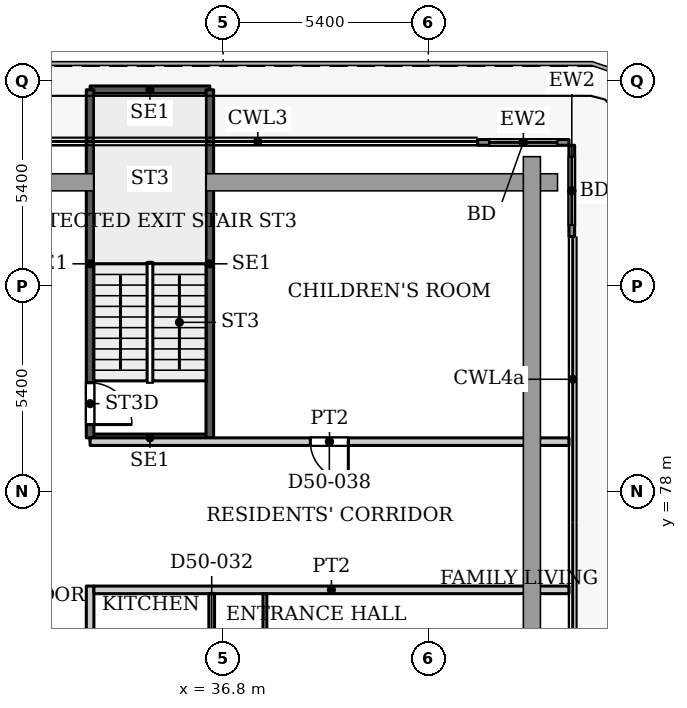
"""IFC4 building model, lengths in metres.
Left out: names, types, materials, properties, quantities, classifications, styles, units other than length and angle.
Written with IfcOpenShell. Run it as: python <this file> out.ifc"""

import sys

from ifc_helpers import new_model, si_unit, direction, frame, frame_2d, origin, place, context, subcontext, project, spatial, rectangle, extrude, source, transform, mapped, element, fill, save


model = new_model("IFC4")
c1 = context("Model", 3, precision=1e-05, world=origin(), true_north=direction((0.0, 1.0)))
c2 = subcontext(c1, "Body", "Model", "MODEL_VIEW")
j1 = project(units=[si_unit("LENGTHUNIT", "METRE"), si_unit("PLANEANGLEUNIT", "RADIAN")], contexts=[c1])
p1 = place(None, origin())
s1 = spatial("IfcSite", under=j1, at=p1, CompositionType="ELEMENT")
p2 = place(p1, origin())
s2 = spatial("IfcBuilding", under=s1, at=p2, CompositionType="ELEMENT")
p3 = place(p2, frame((0.0, 0.0, 220.1)))
s3 = spatial("IfcBuildingStorey", under=s2, at=p3, CompositionType="ELEMENT", Elevation=220.1)
p4 = place(p3, frame((43.5, 87.175, 0.0), z_axis=(0.0, 0.0, 1.0), x_axis=(1.0, 0.0, 0.0)))
e1 = element("IfcWall", 1, at=p4, inside=s3, PredefinedType="SOLIDWALL", context=c2, shape_type="SweptSolid", body=[
    extrude(rectangle(XDim=2.4, YDim=0.15, at=frame_2d((1.2, 0.0))), origin(), (0.0, 0.0, 1.0), 3.75),
])
p5 = place(p4, frame((0.3, 0.0, 0.0)))
e2 = element("IfcOpeningElement", 2, at=p5, cuts=e1, PredefinedType="OPENING", context=c2, shape_type="SweptSolid", body=[
    extrude(rectangle(XDim=1.8, YDim=2.4, at=frame_2d((0.9, 1.2))), frame((0.0, 0.085, 0.0), z_axis=(0.0, -1.0, 0.0), x_axis=(1.0, 0.0, 0.0)), (0.0, 0.0, 1.0), 0.17),
])
p6 = place(p3, frame((45.975, 87.1, 0.0), z_axis=(0.0, 0.0, 1.0), x_axis=(0.0, -1.0, 0.0)))
e3 = element("IfcWall", 3, at=p6, inside=s3, PredefinedType="SOLIDWALL", context=c2, shape_type="SweptSolid", body=[
    extrude(rectangle(XDim=2.4, YDim=0.15, at=frame_2d((1.2, 0.0))), origin(), (0.0, 0.0, 1.0), 3.75),
])
p7 = place(p6, frame((0.3, 0.0, 0.0)))
e4 = element("IfcOpeningElement", 4, at=p7, cuts=e3, PredefinedType="OPENING", context=c2, shape_type="SweptSolid", body=[
    extrude(rectangle(XDim=1.8, YDim=2.4, at=frame_2d((0.9, 1.2))), frame((0.0, 0.085, 0.0), z_axis=(0.0, -1.0, 0.0), x_axis=(1.0, 0.0, 0.0)), (0.0, 0.0, 1.0), 0.17),
])
for number, where, z_axis, x_axis in (
    (5, (33.3, 79.4, 0.0), (0.0, 0.0, 1.0), (1.0, 0.0, 0.0)),
    (6, (33.3, 88.56, 0.0), (0.0, 0.0, 1.0), (1.0, 0.0, 0.0)),
):
    element("IfcWall", number, at=place(p3, frame(where, z_axis=z_axis, x_axis=x_axis)), inside=s3, PredefinedType="SHEAR", context=c2, shape_type="SweptSolid", body=[
        extrude(rectangle(XDim=3.15, YDim=0.2, at=frame_2d((1.575, 0.0))), origin(), (0.0, 0.0, 1.0), 3.9),
    ])
p8 = place(p3, frame((33.3, 79.4, 0.0), z_axis=(0.0, 0.0, 1.0), x_axis=(0.0, 1.0, 0.0)))
e7 = element("IfcWall", 7, at=p8, inside=s3, PredefinedType="SHEAR", context=c2, shape_type="SweptSolid", body=[
    extrude(rectangle(XDim=9.16, YDim=0.2, at=frame_2d((4.58, 0.0))), origin(), (0.0, 0.0, 1.0), 3.9),
])
p9 = place(p8, frame((0.35, 0.0, 0.0)))
e8 = element("IfcOpeningElement", 8, at=p9, cuts=e7, PredefinedType="OPENING", context=c2, shape_type="SweptSolid", body=[
    extrude(rectangle(XDim=1.1, YDim=2.2, at=frame_2d((0.55, 1.1))), frame((0.0, 0.11, 0.0), z_axis=(0.0, -1.0, 0.0), x_axis=(1.0, 0.0, 0.0)), (0.0, 0.0, 1.0), 0.22),
])
p10 = place(p3, frame((36.45, 79.4, 0.0), z_axis=(0.0, 0.0, 1.0), x_axis=(0.0, 1.0, 0.0)))
e9 = element("IfcWall", 9, at=p10, inside=s3, PredefinedType="SHEAR", context=c2, shape_type="SweptSolid", body=[
    extrude(rectangle(XDim=9.16, YDim=0.2, at=frame_2d((4.58, 0.0))), origin(), (0.0, 0.0, 1.0), 3.9),
])
p11 = place(p3, frame((33.3, 57.9, 0.0), z_axis=(0.0, 0.0, 1.0), x_axis=(0.0, 1.0, 0.0)))
e10 = element("IfcWall", 10, at=p11, inside=s3, PredefinedType="PARTITIONING", context=c2, shape_type="SweptSolid", body=[
    extrude(rectangle(XDim=17.6, YDim=0.2, at=frame_2d((8.8, 0.0))), origin(), (0.0, 0.0, 1.0), 3.6),
])
p12 = place(p11, frame((2.9, 0.0, 0.0)))
e11 = element("IfcOpeningElement", 11, at=p12, cuts=e10, PredefinedType="OPENING", context=c2, shape_type="SweptSolid", body=[
    extrude(rectangle(XDim=1.0, YDim=2.1, at=frame_2d((0.5, 1.05))), frame((0.0, 0.11, 0.0), z_axis=(0.0, -1.0, 0.0), x_axis=(1.0, 0.0, 0.0)), (0.0, 0.0, 1.0), 0.22),
])
p13 = place(p11, frame((10.7, 0.0, 0.0)))
e12 = element("IfcOpeningElement", 12, at=p13, cuts=e10, PredefinedType="OPENING", context=c2, shape_type="SweptSolid", body=[
    extrude(rectangle(XDim=1.0, YDim=2.1, at=frame_2d((0.5, 1.05))), frame((0.0, 0.11, 0.0), z_axis=(0.0, -1.0, 0.0), x_axis=(1.0, 0.0, 0.0)), (0.0, 0.0, 1.0), 0.22),
])
p14 = place(p3, frame((33.3, 79.3, 0.0), z_axis=(0.0, 0.0, 1.0), x_axis=(1.0, 0.0, 0.0)))
e13 = element("IfcWall", 13, at=p14, inside=s3, PredefinedType="PARTITIONING", context=c2, shape_type="SweptSolid", body=[
    extrude(rectangle(XDim=12.6, YDim=0.2, at=frame_2d((6.3, 0.0))), origin(), (0.0, 0.0, 1.0), 3.6),
])
p15 = place(p14, frame((5.795, 0.0, 0.0)))
e14 = element("IfcOpeningElement", 14, at=p15, cuts=e13, PredefinedType="OPENING", context=c2, shape_type="SweptSolid", body=[
    extrude(rectangle(XDim=1.0, YDim=2.1, at=frame_2d((0.5, 1.05))), frame((0.0, 0.11, 0.0), z_axis=(0.0, -1.0, 0.0), x_axis=(1.0, 0.0, 0.0)), (0.0, 0.0, 1.0), 0.22),
])
p16 = place(p3, frame((33.4, 75.4, 0.0), z_axis=(0.0, 0.0, 1.0), x_axis=(1.0, 0.0, 0.0)))
e15 = element("IfcWall", 15, at=p16, inside=s3, PredefinedType="PARTITIONING", context=c2, shape_type="SweptSolid", body=[
    extrude(rectangle(XDim=12.5, YDim=0.2, at=frame_2d((6.25, 0.0))), origin(), (0.0, 0.0, 1.0), 3.6),
])
p17 = place(p3, frame((36.5, 69.925, 0.0), z_axis=(0.0, 0.0, 1.0), x_axis=(0.0, 1.0, 0.0)))
e16 = element("IfcWall", 16, at=p17, inside=s3, PredefinedType="PARTITIONING", context=c2, shape_type="SweptSolid", body=[
    extrude(rectangle(XDim=5.375, YDim=0.15, at=frame_2d((2.688, 0.0))), origin(), (0.0, 0.0, 1.0), 3.6),
])
p18 = place(p17, frame((0.875, 0.0, 0.0)))
e17 = element("IfcOpeningElement", 17, at=p18, cuts=e16, PredefinedType="OPENING", context=c2, shape_type="SweptSolid", body=[
    extrude(rectangle(XDim=0.8, YDim=2.1, at=frame_2d((0.4, 1.05))), frame((0.0, 0.085, 0.0), z_axis=(0.0, -1.0, 0.0), x_axis=(1.0, 0.0, 0.0)), (0.0, 0.0, 1.0), 0.17),
])
p19 = place(p17, frame((3.525, 0.0, 0.0)))
e18 = element("IfcOpeningElement", 18, at=p19, cuts=e16, PredefinedType="OPENING", context=c2, shape_type="SweptSolid", body=[
    extrude(rectangle(XDim=0.9, YDim=2.1, at=frame_2d((0.45, 1.05))), frame((0.0, 0.085, 0.0), z_axis=(0.0, -1.0, 0.0), x_axis=(1.0, 0.0, 0.0)), (0.0, 0.0, 1.0), 0.17),
])
p20 = place(p3, frame((37.9, 66.8, 0.0), z_axis=(0.0, 0.0, 1.0), x_axis=(0.0, 1.0, 0.0)))
e19 = element("IfcWall", 19, at=p20, inside=s3, PredefinedType="PARTITIONING", context=c2, shape_type="SweptSolid", body=[
    extrude(rectangle(XDim=8.5, YDim=0.1, at=frame_2d((4.25, 0.0))), origin(), (0.0, 0.0, 1.0), 3.6),
])
p21 = place(p20, frame((1.4, 0.0, 0.0)))
e20 = element("IfcOpeningElement", 20, at=p21, cuts=e19, PredefinedType="OPENING", context=c2, shape_type="SweptSolid", body=[
    extrude(rectangle(XDim=0.9, YDim=2.1, at=frame_2d((0.45, 1.05))), frame((0.0, 0.06, 0.0), z_axis=(0.0, -1.0, 0.0), x_axis=(1.0, 0.0, 0.0)), (0.0, 0.0, 1.0), 0.12),
])
p22 = place(p20, frame((5.7, 0.0, 0.0)))
e21 = element("IfcOpeningElement", 21, at=p22, cuts=e19, PredefinedType="OPENING", context=c2, shape_type="SweptSolid", body=[
    extrude(rectangle(XDim=1.0, YDim=2.1, at=frame_2d((0.5, 1.05))), frame((0.0, 0.06, 0.0), z_axis=(0.0, -1.0, 0.0), x_axis=(1.0, 0.0, 0.0)), (0.0, 0.0, 1.0), 0.12),
])
m1 = source(origin(), c2, "Body", "SweptSolid", [
    extrude(rectangle(XDim=1.8, YDim=2.4, at=frame_2d((0.9, 1.2))), frame((0.0, 0.025, 0.0), z_axis=(0.0, -1.0, 0.0), x_axis=(1.0, 0.0, 0.0)), (0.0, 0.0, 1.0), 0.05),
])
p23 = place(p5, origin())
e22 = element("IfcDoor", 22, at=p23, inside=s3, OperationType="SLIDING_TO_LEFT", PredefinedType="DOOR", context=c2, shape_type="MappedRepresentation", body=[
    mapped(m1, transform((0.0, 0.0, 0.0), x_axis=(1.0, 0.0, 0.0), y_axis=(0.0, 1.0, 0.0), z_axis=(0.0, 0.0, 1.0), scale=1.0)),
])
fill(e2, e22)
p24 = place(p7, origin())
e23 = element("IfcDoor", 23, at=p24, inside=s3, OperationType="SLIDING_TO_LEFT", PredefinedType="DOOR", context=c2, shape_type="MappedRepresentation", body=[
    mapped(m1, transform((0.0, 0.0, 0.0), x_axis=(1.0, 0.0, 0.0), y_axis=(0.0, 1.0, 0.0), z_axis=(0.0, 0.0, 1.0), scale=1.0)),
])
fill(e4, e23)
m2 = source(origin(), c2, "Body", "SweptSolid", [
    extrude(rectangle(XDim=1.1, YDim=2.2, at=frame_2d((0.55, 1.1))), frame((0.0, 0.025, 0.0), z_axis=(0.0, -1.0, 0.0), x_axis=(1.0, 0.0, 0.0)), (0.0, 0.0, 1.0), 0.05),
])
p25 = place(p9, origin())
e24 = element("IfcDoor", 24, at=p25, inside=s3, OperationType="SINGLE_SWING_RIGHT", PredefinedType="DOOR", context=c2, shape_type="MappedRepresentation", body=[
    mapped(m2, transform((0.0, 0.0, 0.0), x_axis=(1.0, 0.0, 0.0), y_axis=(0.0, 1.0, 0.0), z_axis=(0.0, 0.0, 1.0), scale=1.0)),
])
fill(e8, e24)
m3 = source(origin(), c2, "Body", "SweptSolid", [
    extrude(rectangle(XDim=1.0, YDim=2.1, at=frame_2d((0.5, 1.05))), frame((0.0, 0.025, 0.0), z_axis=(0.0, -1.0, 0.0), x_axis=(1.0, 0.0, 0.0)), (0.0, 0.0, 1.0), 0.05),
])
p26 = place(p15, origin())
e25 = element("IfcDoor", 25, at=p26, inside=s3, OperationType="SINGLE_SWING_RIGHT", PredefinedType="DOOR", context=c2, shape_type="MappedRepresentation", body=[
    mapped(m3, transform((0.0, 0.0, 0.0), x_axis=(1.0, 0.0, 0.0), y_axis=(0.0, 1.0, 0.0), z_axis=(0.0, 0.0, 1.0), scale=1.0)),
])
fill(e14, e25)
save(model, sys.argv[1])
